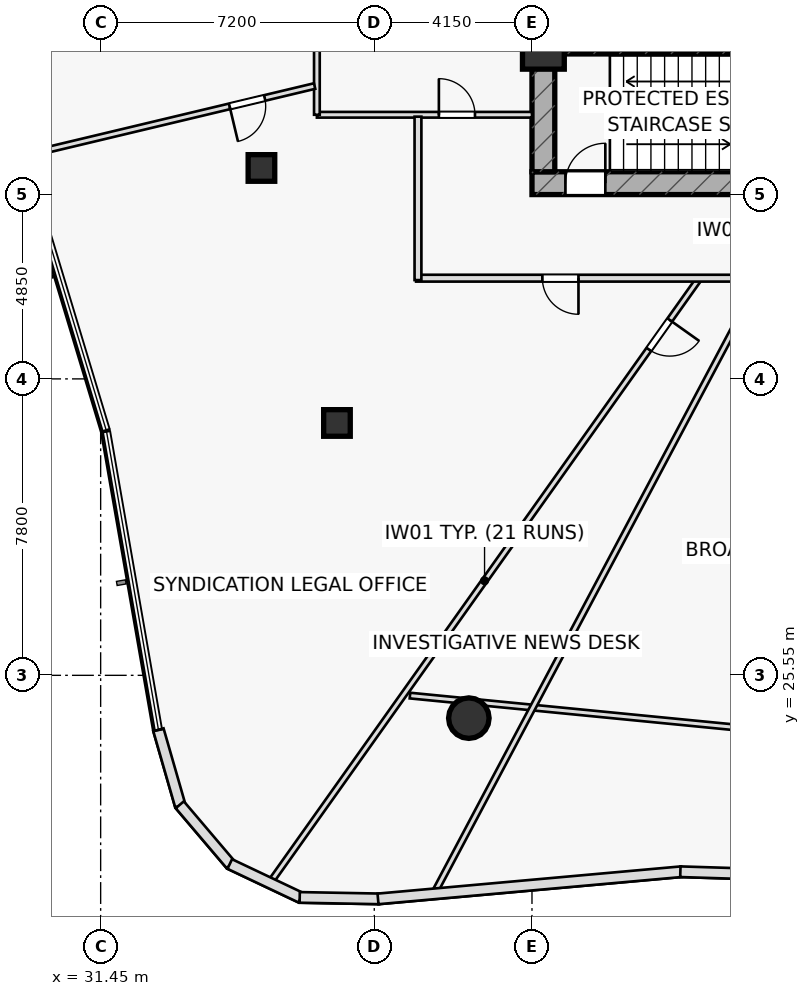
"""IFC4 building model, lengths in metres.
Left out: names, types, materials, properties, quantities, classifications, styles, units other than length and angle.
Written with IfcOpenShell. Run it as: python <this file> out.ifc"""

import sys

from ifc_helpers import new_model, si_unit, direction, frame, frame_2d, origin, origin_2d, place, context, subcontext, project, spatial, rectangle, hollow_rectangle, hollow_circle, extrude, element, fill, save


model = new_model("IFC4")
c1 = context("Model", 3, precision=1e-05, world=origin(), true_north=direction((0.0, 1.0)))
c2 = subcontext(c1, "Body", "Model", "MODEL_VIEW")
j1 = project(units=[si_unit("LENGTHUNIT", "METRE"), si_unit("PLANEANGLEUNIT", "RADIAN")], contexts=[c1])
p1 = place(None, origin())
s1 = spatial("IfcSite", under=j1, at=p1, CompositionType="ELEMENT")
p2 = place(p1, origin())
s2 = spatial("IfcBuilding", under=s1, at=p2, CompositionType="ELEMENT")
p3 = place(p2, frame((0.0, 0.0, 127.15)))
s3 = spatial("IfcBuildingStorey", under=s2, at=p3, CompositionType="ELEMENT", Elevation=127.15)
p4 = place(p3, frame((42.8, 38.5, 0.0), z_axis=(0.0, 0.0, 1.0), x_axis=(1.0, 0.0, 0.0)))
e1 = element("IfcWall", 1, at=p4, inside=s3, PredefinedType="SHEAR", context=c2, shape_type="SweptSolid", body=[
    extrude(rectangle(XDim=14.4, YDim=0.6, at=frame_2d((7.2, 0.0))), origin(), (0.0, 0.0, 1.0), 3.55),
])
p5 = place(p4, frame((0.88, 0.0, 0.0)))
e2 = element("IfcOpeningElement", 2, at=p5, cuts=e1, PredefinedType="OPENING", context=c2, shape_type="SweptSolid", body=[
    extrude(rectangle(XDim=1.05, YDim=2.2, at=frame_2d((0.525, 1.1))), frame((0.0, 0.31, 0.0), z_axis=(0.0, -1.0, 0.0), x_axis=(1.0, 0.0, 0.0)), (0.0, 0.0, 1.0), 0.62),
])
p6 = place(p3, frame((43.1, 38.8, 0.0), z_axis=(0.0, 0.0, 1.0), x_axis=(0.0, 1.0, 0.0)))
e3 = element("IfcWall", 3, at=p6, inside=s3, PredefinedType="SHEAR", context=c2, shape_type="SweptSolid", body=[
    extrude(rectangle(XDim=12.4, YDim=0.6, at=frame_2d((6.2, 0.0))), origin(), (0.0, 0.0, 1.0), 3.55),
])
p7 = place(p3, frame((43.4, 42.05, 0.0), z_axis=(0.0, 0.0, 1.0), x_axis=(1.0, 0.0, 0.0)))
e4 = element("IfcWall", 4, at=p7, inside=s3, PredefinedType="SHEAR", context=c2, shape_type="SweptSolid", body=[
    extrude(rectangle(XDim=13.2, YDim=0.3, at=frame_2d((6.6, 0.0))), origin(), (0.0, 0.0, 1.0), 3.55),
])
p8 = place(p7, frame((8.37, 0.0, 0.0)))
e5 = element("IfcOpeningElement", 5, at=p8, cuts=e4, PredefinedType="OPENING", context=c2, shape_type="SweptSolid", body=[
    extrude(rectangle(XDim=1.1, YDim=2.15, at=frame_2d((0.55, 1.075))), frame((0.0, 0.16, 0.0), z_axis=(0.0, -1.0, 0.0), x_axis=(1.0, 0.0, 0.0)), (0.0, 0.0, 1.0), 0.32),
])
p9 = place(p7, frame((10.09, 0.0, 0.0)))
e6 = element("IfcOpeningElement", 6, at=p9, cuts=e4, PredefinedType="OPENING", context=c2, shape_type="SweptSolid", body=[
    extrude(rectangle(XDim=1.1, YDim=2.15, at=frame_2d((0.55, 1.075))), frame((0.0, 0.16, 0.0), z_axis=(0.0, -1.0, 0.0), x_axis=(1.0, 0.0, 0.0)), (0.0, 0.0, 1.0), 0.32),
])
p10 = place(p7, frame((11.83, 0.0, 0.0)))
e7 = element("IfcOpeningElement", 7, at=p10, cuts=e4, PredefinedType="OPENING", context=c2, shape_type="SweptSolid", body=[
    extrude(rectangle(XDim=1.1, YDim=2.15, at=frame_2d((0.55, 1.075))), frame((0.0, 0.16, 0.0), z_axis=(0.0, -1.0, 0.0), x_axis=(1.0, 0.0, 0.0)), (0.0, 0.0, 1.0), 0.32),
])
p11 = place(p3, frame((43.1, 42.05, 0.0), z_axis=(0.0, 0.0, 1.0), x_axis=(1.0, 0.0, 0.0)))
e8 = element("IfcColumn", 8, at=p11, inside=s3, PredefinedType="COLUMN", context=c2, shape_type="SweptSolid", body=[
    extrude(rectangle(XDim=1.1, YDim=1.1, at=origin_2d()), origin(), (0.0, 0.0, 1.0), 3.55),
])
for number, where, z_axis, x_axis in (
    (9, (35.681, 38.9, 0.0), (0.0, 0.0, 1.0), (1.0, 0.0, 0.0)),
    (10, (37.668, 32.19, 0.0), (0.0, 0.0, 1.0), (1.0, 0.0, 0.0)),
):
    element("IfcColumn", number, at=place(p3, frame(where, z_axis=z_axis, x_axis=x_axis)), inside=s3, PredefinedType="COLUMN", context=c2, shape_type="SweptSolid", body=[
        extrude(hollow_rectangle(XDim=0.7, YDim=0.7, WallThickness=0.04, at=origin_2d()), origin(), (0.0, 0.0, 1.0), 3.55),
    ])
p12 = place(p3, frame((41.139, 24.424, 0.0), z_axis=(0.0, 0.0, 1.0), x_axis=(1.0, 0.0, 0.0)))
e11 = element("IfcColumn", 11, at=p12, inside=s3, PredefinedType="COLUMN", context=c2, shape_type="SweptSolid", body=[
    extrude(hollow_circle(Radius=0.533, WallThickness=0.045, at=origin_2d()), origin(), (0.0, 0.0, 1.0), 3.55),
])
p13 = place(p3, frame((39.589, 25.018, 0.0), z_axis=(0.0, 0.0, 1.0), x_axis=(0.99524905582, -0.097361783517, 0.0)))
e12 = element("IfcWall", 12, at=p13, inside=s3, PredefinedType="PARTITIONING", context=c2, shape_type="SweptSolid", body=[
    extrude(rectangle(XDim=11.467, YDim=0.15, at=frame_2d((5.733, 0.0))), origin(), (0.0, 0.0, 1.0), 2.835),
])
p14 = place(p3, frame((37.14, 40.3, 0.0), z_axis=(0.0, 0.0, 1.0), x_axis=(1.0, 0.0, 0.0)))
e13 = element("IfcWall", 13, at=p14, inside=s3, PredefinedType="PARTITIONING", context=c2, shape_type="SweptSolid", body=[
    extrude(rectangle(XDim=5.66, YDim=0.15, at=frame_2d((2.83, 0.0))), origin(), (0.0, 0.0, 1.0), 3.55),
])
p15 = place(p14, frame((3.21, 0.0, 0.0)))
e14 = element("IfcOpeningElement", 14, at=p15, cuts=e13, PredefinedType="OPENING", context=c2, shape_type="SweptSolid", body=[
    extrude(rectangle(XDim=0.95, YDim=2.05, at=frame_2d((0.475, 1.025))), frame((0.0, 0.085, 0.0), z_axis=(0.0, -1.0, 0.0), x_axis=(1.0, 0.0, 0.0)), (0.0, 0.0, 1.0), 0.17),
])
p16 = place(p3, frame((37.14, 40.3, 0.0), z_axis=(0.0, 0.0, 1.0), x_axis=(0.0, 1.0, 0.0)))
e15 = element("IfcWall", 15, at=p16, inside=s3, PredefinedType="PARTITIONING", context=c2, shape_type="SweptSolid", body=[
    extrude(rectangle(XDim=7.58, YDim=0.15, at=frame_2d((3.79, 0.0))), origin(), (0.0, 0.0, 1.0), 2.835),
])
p17 = place(p3, frame((37.08, 41.055, 0.0), z_axis=(0.0, 0.0, 1.0), x_axis=(-0.972658265099, -0.232241037146, 0.0)))
e16 = element("IfcWall", 16, at=p17, inside=s3, PredefinedType="PARTITIONING", context=c2, shape_type="SweptSolid", body=[
    extrude(rectangle(XDim=7.89, YDim=0.15, at=frame_2d((3.945, 0.0))), origin(), (0.0, 0.0, 1.0), 2.975),
])
p18 = place(p17, frame((1.35, 0.0, 0.0)))
e17 = element("IfcOpeningElement", 17, at=p18, cuts=e16, PredefinedType="OPENING", context=c2, shape_type="SweptSolid", body=[
    extrude(rectangle(XDim=0.95, YDim=2.05, at=frame_2d((0.475, 1.025))), frame((0.0, 0.085, 0.0), z_axis=(0.0, -1.0, 0.0), x_axis=(1.0, 0.0, 0.0)), (0.0, 0.0, 1.0), 0.17),
])
p19 = place(p3, frame((47.207, 36.0, 0.0), z_axis=(0.0, 0.0, 1.0), x_axis=(-0.579100670618, -0.815256041554, 0.0)))
e18 = element("IfcWall", 18, at=p19, inside=s3, PredefinedType="PARTITIONING", context=c2, shape_type="SweptSolid", body=[
    extrude(rectangle(XDim=19.531, YDim=0.15, at=frame_2d((9.765, 0.0))), origin(), (0.0, 0.0, 1.0), 2.835),
])
p20 = place(p19, frame((1.35, 0.0, 0.0)))
e19 = element("IfcOpeningElement", 19, at=p20, cuts=e18, PredefinedType="OPENING", context=c2, shape_type="SweptSolid", body=[
    extrude(rectangle(XDim=0.95, YDim=2.05, at=frame_2d((0.475, 1.025))), frame((0.0, 0.085, 0.0), z_axis=(0.0, -1.0, 0.0), x_axis=(1.0, 0.0, 0.0)), (0.0, 0.0, 1.0), 0.17),
])
p21 = place(p3, frame((48.821, 36.0, 0.0), z_axis=(0.0, 0.0, 1.0), x_axis=(-0.469014212792, -0.883190618269, 0.0)))
e20 = element("IfcWall", 20, at=p21, inside=s3, PredefinedType="PARTITIONING", context=c2, shape_type="SweptSolid", body=[
    extrude(rectangle(XDim=18.356, YDim=0.15, at=frame_2d((9.178, 0.0))), origin(), (0.0, 0.0, 1.0), 2.835),
])
p22 = place(p3, frame((59.45, 36.0, 0.0), z_axis=(0.0, 0.0, 1.0), x_axis=(-1.0, 0.0, 0.0)))
e21 = element("IfcWall", 21, at=p22, inside=s3, PredefinedType="PARTITIONING", context=c2, shape_type="SweptSolid", body=[
    extrude(rectangle(XDim=19.7, YDim=0.18, at=frame_2d((9.85, 0.0))), origin(), (0.0, 0.0, 1.0), 2.835),
])
p23 = place(p22, frame((2.371, 0.0, 0.0)))
e22 = element("IfcOpeningElement", 22, at=p23, cuts=e21, PredefinedType="OPENING", context=c2, shape_type="SweptSolid", body=[
    extrude(rectangle(XDim=0.95, YDim=2.05, at=frame_2d((0.475, 1.025))), frame((0.0, 0.1, 0.0), z_axis=(0.0, -1.0, 0.0), x_axis=(1.0, 0.0, 0.0)), (0.0, 0.0, 1.0), 0.2),
])
p24 = place(p22, frame((7.591, 0.0, 0.0)))
e23 = element("IfcOpeningElement", 23, at=p24, cuts=e21, PredefinedType="OPENING", context=c2, shape_type="SweptSolid", body=[
    extrude(rectangle(XDim=0.95, YDim=2.05, at=frame_2d((0.475, 1.025))), frame((0.0, 0.1, 0.0), z_axis=(0.0, -1.0, 0.0), x_axis=(1.0, 0.0, 0.0)), (0.0, 0.0, 1.0), 0.2),
])
p25 = place(p22, frame((15.427, 0.0, 0.0)))
e24 = element("IfcOpeningElement", 24, at=p25, cuts=e21, PredefinedType="OPENING", context=c2, shape_type="SweptSolid", body=[
    extrude(rectangle(XDim=0.95, YDim=2.05, at=frame_2d((0.475, 1.025))), frame((0.0, 0.1, 0.0), z_axis=(0.0, -1.0, 0.0), x_axis=(1.0, 0.0, 0.0)), (0.0, 0.0, 1.0), 0.2),
])
p26 = place(p3, frame((39.8, 35.95, 0.0), z_axis=(0.0, 0.0, 1.0), x_axis=(0.0, 1.0, 0.0)))
e25 = element("IfcWall", 25, at=p26, inside=s3, PredefinedType="PARTITIONING", context=c2, shape_type="SweptSolid", body=[
    extrude(rectangle(XDim=4.3, YDim=0.18, at=frame_2d((2.15, 0.0))), origin(), (0.0, 0.0, 1.0), 2.835),
])
p27 = place(p3, frame((32.971, 24.116, 0.0), z_axis=(0.0, 0.0, 1.0), x_axis=(0.276472784699, -0.961021747579, 0.0)))
e26 = element("IfcWall", 26, at=p27, inside=s3, PredefinedType="STANDARD", context=c2, shape_type="SweptSolid", body=[
    extrude(rectangle(XDim=2.08, YDim=0.28, at=frame_2d((1.04, 0.0))), origin(), (0.0, 0.0, 1.0), 3.55),
])
p28 = place(p3, frame((33.532, 22.144, 0.0), z_axis=(0.0, 0.0, 1.0), x_axis=(0.647470223072, -0.762090749344, 0.0)))
e27 = element("IfcWall", 27, at=p28, inside=s3, PredefinedType="STANDARD", context=c2, shape_type="SweptSolid", body=[
    extrude(rectangle(XDim=2.068, YDim=0.28, at=frame_2d((1.034, 0.0))), origin(), (0.0, 0.0, 1.0), 3.55),
])
p29 = place(p3, frame((34.847, 20.585, 0.0), z_axis=(0.0, 0.0, 1.0), x_axis=(0.903716205928, -0.428132011351, 0.0)))
e28 = element("IfcWall", 28, at=p29, inside=s3, PredefinedType="STANDARD", context=c2, shape_type="SweptSolid", body=[
    extrude(rectangle(XDim=2.068, YDim=0.28, at=frame_2d((1.034, 0.0))), origin(), (0.0, 0.0, 1.0), 3.55),
])
p30 = place(p3, frame((36.688, 19.707, 0.0), z_axis=(0.0, 0.0, 1.0), x_axis=(0.999829775202, -0.018450491063, 0.0)))
e29 = element("IfcWall", 29, at=p30, inside=s3, PredefinedType="STANDARD", context=c2, shape_type="SweptSolid", body=[
    extrude(rectangle(XDim=2.091, YDim=0.28, at=frame_2d((1.045, 0.0))), origin(), (0.0, 0.0, 1.0), 3.55),
])
p31 = place(p3, frame((38.748, 19.667, 0.0), z_axis=(0.0, 0.0, 1.0), x_axis=(0.996004258256, 0.089305753094, 0.0)))
e30 = element("IfcWall", 30, at=p31, inside=s3, PredefinedType="STANDARD", context=c2, shape_type="SweptSolid", body=[
    extrude(rectangle(XDim=8.018, YDim=0.28, at=frame_2d((4.009, 0.0))), origin(), (0.0, 0.0, 1.0), 3.55),
])
p32 = place(p3, frame((46.704, 20.383, 0.0), z_axis=(0.0, 0.0, 1.0), x_axis=(0.999511053197, -0.031267467704, 0.0)))
e31 = element("IfcWall", 31, at=p32, inside=s3, PredefinedType="STANDARD", context=c2, shape_type="SweptSolid", body=[
    extrude(rectangle(XDim=8.62, YDim=0.28, at=frame_2d((4.31, 0.0))), origin(), (0.0, 0.0, 1.0), 3.55),
])
p33 = place(p5, origin())
e32 = element("IfcDoor", 32, at=p33, inside=s3, OperationType="SINGLE_SWING_RIGHT", PredefinedType="DOOR", context=c2, shape_type="SweptSolid", body=[
    extrude(rectangle(XDim=1.05, YDim=2.2, at=frame_2d((0.525, 1.1))), frame((0.0, 0.025, 0.0), z_axis=(0.0, -1.0, 0.0), x_axis=(1.0, 0.0, 0.0)), (0.0, 0.0, 1.0), 0.05),
])
fill(e2, e32)
p34 = place(p15, origin())
e33 = element("IfcDoor", 33, at=p34, inside=s3, OperationType="SINGLE_SWING_LEFT", PredefinedType="DOOR", context=c2, shape_type="SweptSolid", body=[
    extrude(rectangle(XDim=0.95, YDim=2.05, at=frame_2d((0.475, 1.025))), frame((0.0, 0.025, 0.0), z_axis=(0.0, -1.0, 0.0), x_axis=(1.0, 0.0, 0.0)), (0.0, 0.0, 1.0), 0.05),
])
fill(e14, e33)
p35 = place(p18, origin())
e34 = element("IfcDoor", 34, at=p35, inside=s3, OperationType="SINGLE_SWING_RIGHT", PredefinedType="DOOR", context=c2, shape_type="SweptSolid", body=[
    extrude(rectangle(XDim=0.95, YDim=2.05, at=frame_2d((0.475, 1.025))), frame((0.0, 0.025, 0.0), z_axis=(0.0, -1.0, 0.0), x_axis=(1.0, 0.0, 0.0)), (0.0, 0.0, 1.0), 0.05),
])
fill(e17, e34)
p36 = place(p20, origin())
e35 = element("IfcDoor", 35, at=p36, inside=s3, OperationType="SINGLE_SWING_LEFT", PredefinedType="DOOR", context=c2, shape_type="SweptSolid", body=[
    extrude(rectangle(XDim=0.95, YDim=2.05, at=frame_2d((0.475, 1.025))), frame((0.0, 0.025, 0.0), z_axis=(0.0, -1.0, 0.0), x_axis=(1.0, 0.0, 0.0)), (0.0, 0.0, 1.0), 0.05),
])
fill(e19, e35)
p37 = place(p25, origin())
e36 = element("IfcDoor", 36, at=p37, inside=s3, OperationType="SINGLE_SWING_LEFT", PredefinedType="DOOR", context=c2, shape_type="SweptSolid", body=[
    extrude(rectangle(XDim=0.95, YDim=2.05, at=frame_2d((0.475, 1.025))), frame((0.0, 0.025, 0.0), z_axis=(0.0, -1.0, 0.0), x_axis=(1.0, 0.0, 0.0)), (0.0, 0.0, 1.0), 0.05),
])
fill(e24, e36)
save(model, sys.argv[1])
